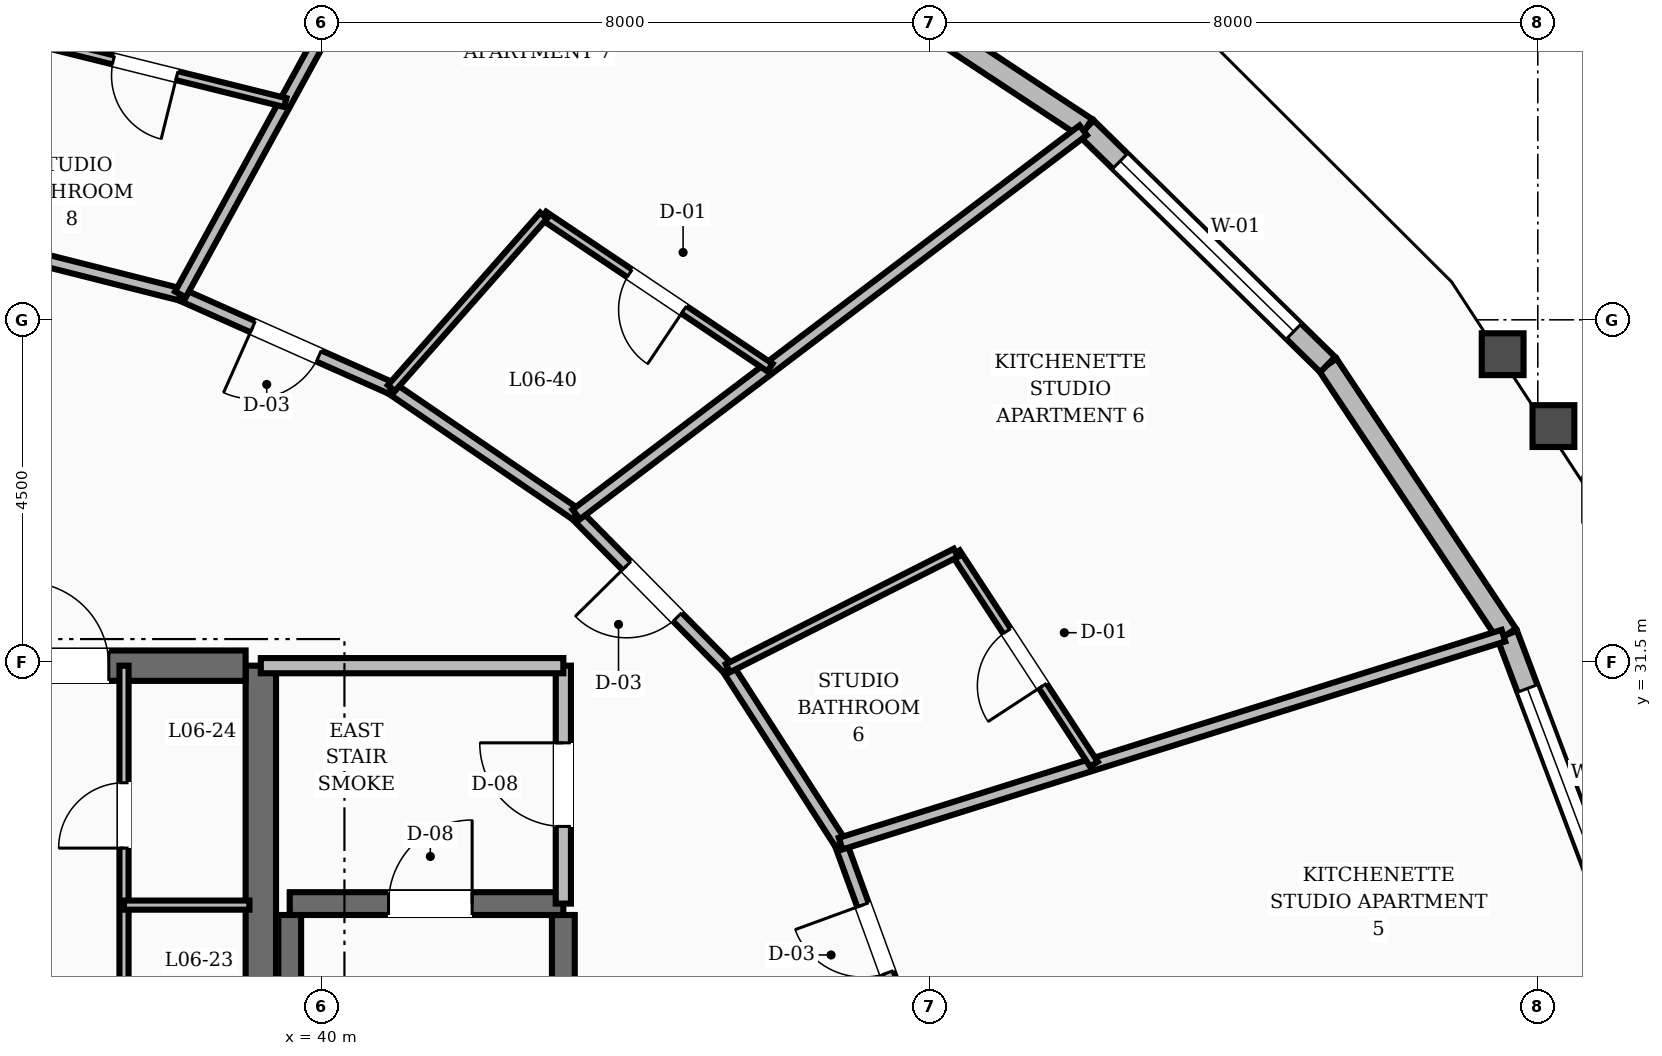
"""IFC4 building model, lengths in metres.
Left out: names, types, materials, properties, quantities, classifications, styles, units other than length and angle.
Written with IfcOpenShell. Run it as: python <this file> out.ifc"""

import sys

from ifc_helpers import new_model, si_unit, direction, frame, frame_2d, origin, place, context, subcontext, project, spatial, rectangle, extrude, element, fill, save


model = new_model("IFC4")
c1 = context("Model", 3, precision=1e-05, world=origin(), true_north=direction((0.0, 1.0)))
c2 = subcontext(c1, "Body", "Model", "MODEL_VIEW")
j1 = project(units=[si_unit("LENGTHUNIT", "METRE"), si_unit("PLANEANGLEUNIT", "RADIAN")], contexts=[c1])
p1 = place(None, origin())
s1 = spatial("IfcSite", under=j1, at=p1, CompositionType="ELEMENT")
p2 = place(p1, origin())
s2 = spatial("IfcBuilding", under=s1, at=p2, CompositionType="ELEMENT")
p3 = place(p2, frame((0.0, 0.0, 30.4)))
s3 = spatial("IfcBuildingStorey", under=s2, at=p3, CompositionType="ELEMENT", Elevation=30.4)
p4 = place(p3, frame((39.2, 25.15, 0.0), z_axis=(0.0, 0.0, 1.0), x_axis=(0.0, 1.0, 0.0)))
e1 = element("IfcWall", 1, at=p4, inside=s3, PredefinedType="SHEAR", context=c2, shape_type="SweptSolid", body=[
    extrude(rectangle(XDim=6.3, YDim=0.4, at=frame_2d((3.15, 0.0))), origin(), (0.0, 0.0, 1.0), 3.6),
])
p5 = place(p3, frame((35.8, 31.45, 0.0), z_axis=(0.0, 0.0, 1.0), x_axis=(1.0, 0.0, 0.0)))
e2 = element("IfcWall", 2, at=p5, inside=s3, PredefinedType="SHEAR", context=c2, shape_type="SweptSolid", body=[
    extrude(rectangle(XDim=3.2, YDim=0.4, at=frame_2d((1.6, 0.0))), origin(), (0.0, 0.0, 1.0), 3.6),
])
p6 = place(p5, frame((0.3, 0.0, 0.0)))
e3 = element("IfcOpeningElement", 3, at=p6, cuts=e2, PredefinedType="OPENING", context=c2, shape_type="SweptSolid", body=[
    extrude(rectangle(XDim=1.1, YDim=2.1, at=frame_2d((0.55, 1.05))), frame((0.0, 0.21, 0.0), z_axis=(0.0, -1.0, 0.0), x_axis=(1.0, 0.0, 0.0)), (0.0, 0.0, 1.0), 0.42),
])
for number, where, z_axis, x_axis in (
    (4, (43.18, 19.43, 0.0), (0.0, 0.0, 1.0), (0.0, 1.0, 0.0)),
    (5, (39.58, 19.43, 0.0), (0.0, 0.0, 1.0), (0.0, 1.0, 0.0)),
):
    element("IfcWall", number, at=place(p3, frame(where, z_axis=z_axis, x_axis=x_axis)), inside=s3, PredefinedType="SHEAR", context=c2, shape_type="SweptSolid", body=[
        extrude(rectangle(XDim=8.74, YDim=0.3, at=frame_2d((4.37, 0.0))), origin(), (0.0, 0.0, 1.0), 3.6),
    ])
p7 = place(p3, frame((39.58, 28.32, 0.0), z_axis=(0.0, 0.0, 1.0), x_axis=(1.0, 0.0, 0.0)))
e6 = element("IfcWall", 6, at=p7, inside=s3, PredefinedType="SHEAR", context=c2, shape_type="SweptSolid", body=[
    extrude(rectangle(XDim=3.6, YDim=0.3, at=frame_2d((1.8, 0.0))), origin(), (0.0, 0.0, 1.0), 3.6),
])
p8 = place(p7, frame((1.3, 0.0, 0.0)))
e7 = element("IfcOpeningElement", 7, at=p8, cuts=e6, PredefinedType="OPENING", context=c2, shape_type="SweptSolid", body=[
    extrude(rectangle(XDim=1.1, YDim=2.1, at=frame_2d((0.55, 1.05))), frame((0.0, 0.16, 0.0), z_axis=(0.0, -1.0, 0.0), x_axis=(1.0, 0.0, 0.0)), (0.0, 0.0, 1.0), 0.32),
])
p9 = place(p3, frame((57.049, 28.007, 0.0), z_axis=(0.0, 0.0, 1.0), x_axis=(-0.352909401731, 0.935657498324, 0.0)))
e8 = element("IfcWall", 8, at=p9, inside=s3, PredefinedType="STANDARD", context=c2, shape_type="SweptSolid", body=[
    extrude(rectangle(XDim=4.118, YDim=0.28, at=frame_2d((2.059, 0.0))), origin(), (0.0, 0.0, 1.0), 2.65),
])
p10 = place(p9, frame((0.759, 0.0, 0.8)))
e9 = element("IfcOpeningElement", 9, at=p10, cuts=e8, PredefinedType="OPENING", context=c2, shape_type="SweptSolid", body=[
    extrude(rectangle(XDim=2.6, YDim=1.65, at=frame_2d((1.3, 0.825))), frame((0.0, 0.15, 0.0), z_axis=(0.0, -1.0, 0.0), x_axis=(1.0, 0.0, 0.0)), (0.0, 0.0, 1.0), 0.3),
])
p11 = place(p3, frame((55.596, 31.86, 0.0), z_axis=(0.0, 0.0, 1.0), x_axis=(-0.55356334222, 0.832807076189, 0.0)))
e10 = element("IfcWall", 10, at=p11, inside=s3, PredefinedType="STANDARD", context=c2, shape_type="SweptSolid", body=[
    extrude(rectangle(XDim=4.264, YDim=0.28, at=frame_2d((2.132, 0.0))), origin(), (0.0, 0.0, 1.0), 2.65),
])
p12 = place(p3, frame((53.236, 35.411, 0.0), z_axis=(0.0, 0.0, 1.0), x_axis=(-0.714207899037, 0.699933623248, 0.0)))
e11 = element("IfcWall", 11, at=p12, inside=s3, PredefinedType="STANDARD", context=c2, shape_type="SweptSolid", body=[
    extrude(rectangle(XDim=4.447, YDim=0.28, at=frame_2d((2.224, 0.0))), origin(), (0.0, 0.0, 1.0), 2.65),
])
p13 = place(p12, frame((0.624, 0.0, 0.8)))
e12 = element("IfcOpeningElement", 12, at=p13, cuts=e11, PredefinedType="OPENING", context=c2, shape_type="SweptSolid", body=[
    extrude(rectangle(XDim=3.2, YDim=1.65, at=frame_2d((1.6, 0.825))), frame((0.0, 0.15, 0.0), z_axis=(0.0, -1.0, 0.0), x_axis=(1.0, 0.0, 0.0)), (0.0, 0.0, 1.0), 0.3),
])
p14 = place(p3, frame((50.06, 38.524, 0.0), z_axis=(0.0, 0.0, 1.0), x_axis=(-0.834608922487, 0.550842941776, 0.0)))
e13 = element("IfcWall", 13, at=p14, inside=s3, PredefinedType="STANDARD", context=c2, shape_type="SweptSolid", body=[
    extrude(rectangle(XDim=4.637, YDim=0.28, at=frame_2d((2.319, 0.0))), origin(), (0.0, 0.0, 1.0), 2.65),
])
p15 = place(p3, frame((43.18, 28.32, 0.0), z_axis=(0.0, 0.0, 1.0), x_axis=(0.0, 1.0, 0.0)))
e14 = element("IfcWall", 14, at=p15, inside=s3, PredefinedType="SOLIDWALL", context=c2, shape_type="SweptSolid", body=[
    extrude(rectangle(XDim=3.13, YDim=0.2, at=frame_2d((1.565, 0.0))), origin(), (0.0, 0.0, 1.0), 2.61),
])
p16 = place(p15, frame((1.015, 0.0, 0.0)))
e15 = element("IfcOpeningElement", 15, at=p16, cuts=e14, PredefinedType="OPENING", context=c2, shape_type="SweptSolid", body=[
    extrude(rectangle(XDim=1.1, YDim=2.1, at=frame_2d((0.55, 1.05))), frame((0.0, 0.11, 0.0), z_axis=(0.0, -1.0, 0.0), x_axis=(1.0, 0.0, 0.0)), (0.0, 0.0, 1.0), 0.22),
])
p17 = place(p3, frame((39.2, 31.45, 0.0), z_axis=(0.0, 0.0, 1.0), x_axis=(1.0, 0.0, 0.0)))
e16 = element("IfcWall", 16, at=p17, inside=s3, PredefinedType="SOLIDWALL", context=c2, shape_type="SweptSolid", body=[
    extrude(rectangle(XDim=3.98, YDim=0.2, at=frame_2d((1.99, 0.0))), origin(), (0.0, 0.0, 1.0), 2.61),
])
p18 = place(p3, frame((37.4, 25.25, 0.0), z_axis=(0.0, 0.0, 1.0), x_axis=(0.0, 1.0, 0.0)))
e17 = element("IfcWall", 17, at=p18, inside=s3, PredefinedType="PARTITIONING", context=c2, shape_type="SweptSolid", body=[
    extrude(rectangle(XDim=6.2, YDim=0.12, at=frame_2d((3.1, 0.0))), origin(), (0.0, 0.0, 1.0), 2.61),
])
p19 = place(p18, frame((0.8, 0.0, 0.0)))
e18 = element("IfcOpeningElement", 18, at=p19, cuts=e17, PredefinedType="OPENING", context=c2, shape_type="SweptSolid", body=[
    extrude(rectangle(XDim=0.86, YDim=2.1, at=frame_2d((0.43, 1.05))), frame((0.0, 0.07, 0.0), z_axis=(0.0, -1.0, 0.0), x_axis=(1.0, 0.0, 0.0)), (0.0, 0.0, 1.0), 0.14),
])
p20 = place(p18, frame((3.8, 0.0, 0.0)))
e19 = element("IfcOpeningElement", 19, at=p20, cuts=e17, PredefinedType="OPENING", context=c2, shape_type="SweptSolid", body=[
    extrude(rectangle(XDim=0.86, YDim=2.1, at=frame_2d((0.43, 1.05))), frame((0.0, 0.07, 0.0), z_axis=(0.0, -1.0, 0.0), x_axis=(1.0, 0.0, 0.0)), (0.0, 0.0, 1.0), 0.14),
])
p21 = place(p3, frame((37.4, 28.3, 0.0), z_axis=(0.0, 0.0, 1.0), x_axis=(1.0, 0.0, 0.0)))
e20 = element("IfcWall", 20, at=p21, inside=s3, PredefinedType="PARTITIONING", context=c2, shape_type="SweptSolid", body=[
    extrude(rectangle(XDim=1.65, YDim=0.12, at=frame_2d((0.825, 0.0))), origin(), (0.0, 0.0, 1.0), 2.61),
])
p22 = place(p3, frame((47.742, 26.604, 0.0), z_axis=(0.0, 0.0, 1.0), x_axis=(-0.342617982381, 0.939474809747, 0.0)))
e21 = element("IfcWall", 21, at=p22, inside=s3, PredefinedType="SOLIDWALL", context=c2, shape_type="SweptSolid", body=[
    extrude(rectangle(XDim=2.666, YDim=0.16, at=frame_2d((1.333, 0.0))), origin(), (0.0, 0.0, 1.0), 2.61),
])
p23 = place(p22, frame((0.858, 0.0, 0.0)))
e22 = element("IfcOpeningElement", 22, at=p23, cuts=e21, PredefinedType="OPENING", context=c2, shape_type="SweptSolid", body=[
    extrude(rectangle(XDim=0.95, YDim=2.1, at=frame_2d((0.475, 1.05))), frame((0.0, 0.09, 0.0), z_axis=(0.0, -1.0, 0.0), x_axis=(1.0, 0.0, 0.0)), (0.0, 0.0, 1.0), 0.18),
])
p24 = place(p3, frame((46.828, 29.109, 0.0), z_axis=(0.0, 0.0, 1.0), x_axis=(-0.540595670038, 0.841282545603, 0.0)))
e23 = element("IfcWall", 23, at=p24, inside=s3, PredefinedType="SOLIDWALL", context=c2, shape_type="SweptSolid", body=[
    extrude(rectangle(XDim=2.744, YDim=0.16, at=frame_2d((1.372, 0.0))), origin(), (0.0, 0.0, 1.0), 2.61),
])
p25 = place(p3, frame((45.345, 31.417, 0.0), z_axis=(0.0, 0.0, 1.0), x_axis=(-0.702366174226, 0.711815816981, 0.0)))
e24 = element("IfcWall", 24, at=p25, inside=s3, PredefinedType="SOLIDWALL", context=c2, shape_type="SweptSolid", body=[
    extrude(rectangle(XDim=2.842, YDim=0.16, at=frame_2d((1.421, 0.0))), origin(), (0.0, 0.0, 1.0), 2.61),
])
p26 = place(p25, frame((0.946, 0.0, 0.0)))
e25 = element("IfcOpeningElement", 25, at=p26, cuts=e24, PredefinedType="OPENING", context=c2, shape_type="SweptSolid", body=[
    extrude(rectangle(XDim=0.95, YDim=2.1, at=frame_2d((0.475, 1.05))), frame((0.0, 0.09, 0.0), z_axis=(0.0, -1.0, 0.0), x_axis=(1.0, 0.0, 0.0)), (0.0, 0.0, 1.0), 0.18),
])
p27 = place(p3, frame((43.349, 33.44, 0.0), z_axis=(0.0, 0.0, 1.0), x_axis=(-0.825929039072, 0.563774088104, 0.0)))
e26 = element("IfcWall", 26, at=p27, inside=s3, PredefinedType="SOLIDWALL", context=c2, shape_type="SweptSolid", body=[
    extrude(rectangle(XDim=2.945, YDim=0.16, at=frame_2d((1.472, 0.0))), origin(), (0.0, 0.0, 1.0), 2.61),
])
p28 = place(p3, frame((40.917, 35.1, 0.0), z_axis=(0.0, 0.0, 1.0), x_axis=(-0.913768445178, 0.406235434936, 0.0)))
e27 = element("IfcWall", 27, at=p28, inside=s3, PredefinedType="SOLIDWALL", context=c2, shape_type="SweptSolid", body=[
    extrude(rectangle(XDim=3.037, YDim=0.16, at=frame_2d((1.519, 0.0))), origin(), (0.0, 0.0, 1.0), 2.61),
])
p29 = place(p28, frame((1.043, 0.0, 0.0)))
e28 = element("IfcOpeningElement", 28, at=p29, cuts=e27, PredefinedType="OPENING", context=c2, shape_type="SweptSolid", body=[
    extrude(rectangle(XDim=0.95, YDim=2.1, at=frame_2d((0.475, 1.05))), frame((0.0, 0.09, 0.0), z_axis=(0.0, -1.0, 0.0), x_axis=(1.0, 0.0, 0.0)), (0.0, 0.0, 1.0), 0.18),
])
p30 = place(p3, frame((38.142, 36.334, 0.0), z_axis=(0.0, 0.0, 1.0), x_axis=(-0.969608333194, 0.244662380029, 0.0)))
e29 = element("IfcWall", 29, at=p30, inside=s3, PredefinedType="SOLIDWALL", context=c2, shape_type="SweptSolid", body=[
    extrude(rectangle(XDim=3.105, YDim=0.16, at=frame_2d((1.553, 0.0))), origin(), (0.0, 0.0, 1.0), 2.61),
])
p31 = place(p3, frame((46.828, 29.109, 0.0), z_axis=(0.0, 0.0, 1.0), x_axis=(0.954123744585, 0.299412558218, 0.0)))
e30 = element("IfcWall", 30, at=p31, inside=s3, PredefinedType="SOLIDWALL", context=c2, shape_type="SweptSolid", body=[
    extrude(rectangle(XDim=9.139, YDim=0.16, at=frame_2d((4.569, 0.0))), origin(), (0.0, 0.0, 1.0), 2.61),
])
p32 = place(p3, frame((50.16, 30.154, 0.0), z_axis=(0.0, 0.0, 1.0), x_axis=(-0.546906681568, 0.837193574782, 0.0)))
e31 = element("IfcWall", 31, at=p32, inside=s3, PredefinedType="PARTITIONING", context=c2, shape_type="SweptSolid", body=[
    extrude(rectangle(XDim=3.321, YDim=0.12, at=frame_2d((1.661, 0.0))), origin(), (0.0, 0.0, 1.0), 2.61),
])
p33 = place(p32, frame((1.231, 0.0, 0.0)))
e32 = element("IfcOpeningElement", 32, at=p33, cuts=e31, PredefinedType="OPENING", context=c2, shape_type="SweptSolid", body=[
    extrude(rectangle(XDim=0.86, YDim=2.1, at=frame_2d((0.43, 1.05))), frame((0.0, 0.07, 0.0), z_axis=(0.0, -1.0, 0.0), x_axis=(1.0, 0.0, 0.0)), (0.0, 0.0, 1.0), 0.14),
])
p34 = place(p3, frame((45.345, 31.417, 0.0), z_axis=(0.0, 0.0, 1.0), x_axis=(0.892193104213, 0.451654142895, 0.0)))
e33 = element("IfcWall", 33, at=p34, inside=s3, PredefinedType="PARTITIONING", context=c2, shape_type="SweptSolid", body=[
    extrude(rectangle(XDim=3.361, YDim=0.12, at=frame_2d((1.68, 0.0))), origin(), (0.0, 0.0, 1.0), 2.61),
])
p35 = place(p3, frame((43.349, 33.44, 0.0), z_axis=(0.0, 0.0, 1.0), x_axis=(0.797056829768, 0.603904305433, 0.0)))
e34 = element("IfcWall", 34, at=p35, inside=s3, PredefinedType="SOLIDWALL", context=c2, shape_type="SweptSolid", body=[
    extrude(rectangle(XDim=8.369, YDim=0.16, at=frame_2d((4.185, 0.0))), origin(), (0.0, 0.0, 1.0), 2.61),
])
p36 = place(p3, frame((45.899, 35.372, 0.0), z_axis=(0.0, 0.0, 1.0), x_axis=(-0.830224279985, 0.557429497716, 0.0)))
e35 = element("IfcWall", 35, at=p36, inside=s3, PredefinedType="PARTITIONING", context=c2, shape_type="SweptSolid", body=[
    extrude(rectangle(XDim=3.588, YDim=0.12, at=frame_2d((1.794, 0.0))), origin(), (0.0, 0.0, 1.0), 2.61),
])
p37 = place(p36, frame((1.364, 0.0, 0.0)))
e36 = element("IfcOpeningElement", 36, at=p37, cuts=e35, PredefinedType="OPENING", context=c2, shape_type="SweptSolid", body=[
    extrude(rectangle(XDim=0.86, YDim=2.1, at=frame_2d((0.43, 1.05))), frame((0.0, 0.07, 0.0), z_axis=(0.0, -1.0, 0.0), x_axis=(1.0, 0.0, 0.0)), (0.0, 0.0, 1.0), 0.14),
])
p38 = place(p3, frame((40.917, 35.1, 0.0), z_axis=(0.0, 0.0, 1.0), x_axis=(0.661427007528, 0.750009542414, 0.0)))
e37 = element("IfcWall", 37, at=p38, inside=s3, PredefinedType="PARTITIONING", context=c2, shape_type="SweptSolid", body=[
    extrude(rectangle(XDim=3.029, YDim=0.12, at=frame_2d((1.515, 0.0))), origin(), (0.0, 0.0, 1.0), 2.61),
])
p39 = place(p3, frame((38.142, 36.334, 0.0), z_axis=(0.0, 0.0, 1.0), x_axis=(0.479700277593, 0.877432415447, 0.0)))
e38 = element("IfcWall", 38, at=p39, inside=s3, PredefinedType="SOLIDWALL", context=c2, shape_type="SweptSolid", body=[
    extrude(rectangle(XDim=7.521, YDim=0.16, at=frame_2d((3.76, 0.0))), origin(), (0.0, 0.0, 1.0), 2.61),
])
p40 = place(p3, frame((39.522, 38.858, 0.0), z_axis=(0.0, 0.0, 1.0), x_axis=(-0.970549351757, 0.240902378161, 0.0)))
e39 = element("IfcWall", 39, at=p40, inside=s3, PredefinedType="PARTITIONING", context=c2, shape_type="SweptSolid", body=[
    extrude(rectangle(XDim=3.799, YDim=0.12, at=frame_2d((1.9, 0.0))), origin(), (0.0, 0.0, 1.0), 2.61),
])
p41 = place(p40, frame((1.47, 0.0, 0.0)))
e40 = element("IfcOpeningElement", 40, at=p41, cuts=e39, PredefinedType="OPENING", context=c2, shape_type="SweptSolid", body=[
    extrude(rectangle(XDim=0.86, YDim=2.1, at=frame_2d((0.43, 1.05))), frame((0.0, 0.07, 0.0), z_axis=(0.0, -1.0, 0.0), x_axis=(1.0, 0.0, 0.0)), (0.0, 0.0, 1.0), 0.14),
])
p42 = place(p10, origin())
e41 = element("IfcWindow", 41, at=p42, inside=s3, PartitioningType="SINGLE_PANEL", PredefinedType="WINDOW", context=c2, shape_type="SweptSolid", body=[
    extrude(rectangle(XDim=2.6, YDim=1.65, at=frame_2d((1.3, 0.825))), frame((0.0, 0.03, 0.0), z_axis=(0.0, -1.0, 0.0), x_axis=(1.0, 0.0, 0.0)), (0.0, 0.0, 1.0), 0.06),
])
fill(e9, e41)
p43 = place(p13, origin())
e42 = element("IfcWindow", 42, at=p43, inside=s3, PartitioningType="SINGLE_PANEL", PredefinedType="WINDOW", context=c2, shape_type="SweptSolid", body=[
    extrude(rectangle(XDim=3.2, YDim=1.65, at=frame_2d((1.6, 0.825))), frame((0.0, 0.03, 0.0), z_axis=(0.0, -1.0, 0.0), x_axis=(1.0, 0.0, 0.0)), (0.0, 0.0, 1.0), 0.06),
])
fill(e12, e42)
p44 = place(p8, origin())
e43 = element("IfcDoor", 43, at=p44, inside=s3, OperationType="SINGLE_SWING_RIGHT", PredefinedType="DOOR", context=c2, shape_type="SweptSolid", body=[
    extrude(rectangle(XDim=1.1, YDim=2.1, at=frame_2d((0.55, 1.05))), frame((0.0, 0.025, 0.0), z_axis=(0.0, -1.0, 0.0), x_axis=(1.0, 0.0, 0.0)), (0.0, 0.0, 1.0), 0.05),
])
fill(e7, e43)
p45 = place(p16, origin())
e44 = element("IfcDoor", 44, at=p45, inside=s3, OperationType="SINGLE_SWING_RIGHT", PredefinedType="DOOR", context=c2, shape_type="SweptSolid", body=[
    extrude(rectangle(XDim=1.1, YDim=2.1, at=frame_2d((0.55, 1.05))), frame((0.0, 0.025, 0.0), z_axis=(0.0, -1.0, 0.0), x_axis=(1.0, 0.0, 0.0)), (0.0, 0.0, 1.0), 0.05),
])
fill(e15, e44)
p46 = place(p6, origin())
e45 = element("IfcDoor", 45, at=p46, inside=s3, OperationType="SINGLE_SWING_LEFT", PredefinedType="DOOR", context=c2, shape_type="SweptSolid", body=[
    extrude(rectangle(XDim=1.1, YDim=2.1, at=frame_2d((0.55, 1.05))), frame((0.0, 0.025, 0.0), z_axis=(0.0, -1.0, 0.0), x_axis=(1.0, 0.0, 0.0)), (0.0, 0.0, 1.0), 0.05),
])
fill(e3, e45)
p47 = place(p20, origin())
e46 = element("IfcDoor", 46, at=p47, inside=s3, OperationType="SINGLE_SWING_LEFT", PredefinedType="DOOR", context=c2, shape_type="SweptSolid", body=[
    extrude(rectangle(XDim=0.86, YDim=2.1, at=frame_2d((0.43, 1.05))), frame((0.0, 0.025, 0.0), z_axis=(0.0, -1.0, 0.0), x_axis=(1.0, 0.0, 0.0)), (0.0, 0.0, 1.0), 0.05),
])
fill(e19, e46)
p48 = place(p23, origin())
e47 = element("IfcDoor", 47, at=p48, inside=s3, OperationType="SINGLE_SWING_RIGHT", PredefinedType="DOOR", context=c2, shape_type="SweptSolid", body=[
    extrude(rectangle(XDim=0.95, YDim=2.1, at=frame_2d((0.475, 1.05))), frame((0.0, 0.025, 0.0), z_axis=(0.0, -1.0, 0.0), x_axis=(1.0, 0.0, 0.0)), (0.0, 0.0, 1.0), 0.05),
])
fill(e22, e47)
p49 = place(p33, origin())
e48 = element("IfcDoor", 48, at=p49, inside=s3, OperationType="SINGLE_SWING_LEFT", PredefinedType="DOOR", context=c2, shape_type="SweptSolid", body=[
    extrude(rectangle(XDim=0.86, YDim=2.1, at=frame_2d((0.43, 1.05))), frame((0.0, 0.025, 0.0), z_axis=(0.0, -1.0, 0.0), x_axis=(1.0, 0.0, 0.0)), (0.0, 0.0, 1.0), 0.05),
])
fill(e32, e48)
p50 = place(p26, origin())
e49 = element("IfcDoor", 49, at=p50, inside=s3, OperationType="SINGLE_SWING_RIGHT", PredefinedType="DOOR", context=c2, shape_type="SweptSolid", body=[
    extrude(rectangle(XDim=0.95, YDim=2.1, at=frame_2d((0.475, 1.05))), frame((0.0, 0.025, 0.0), z_axis=(0.0, -1.0, 0.0), x_axis=(1.0, 0.0, 0.0)), (0.0, 0.0, 1.0), 0.05),
])
fill(e25, e49)
p51 = place(p37, origin())
e50 = element("IfcDoor", 50, at=p51, inside=s3, OperationType="SINGLE_SWING_LEFT", PredefinedType="DOOR", context=c2, shape_type="SweptSolid", body=[
    extrude(rectangle(XDim=0.86, YDim=2.1, at=frame_2d((0.43, 1.05))), frame((0.0, 0.025, 0.0), z_axis=(0.0, -1.0, 0.0), x_axis=(1.0, 0.0, 0.0)), (0.0, 0.0, 1.0), 0.05),
])
fill(e36, e50)
p52 = place(p29, origin())
e51 = element("IfcDoor", 51, at=p52, inside=s3, OperationType="SINGLE_SWING_RIGHT", PredefinedType="DOOR", context=c2, shape_type="SweptSolid", body=[
    extrude(rectangle(XDim=0.95, YDim=2.1, at=frame_2d((0.475, 1.05))), frame((0.0, 0.025, 0.0), z_axis=(0.0, -1.0, 0.0), x_axis=(1.0, 0.0, 0.0)), (0.0, 0.0, 1.0), 0.05),
])
fill(e28, e51)
p53 = place(p41, origin())
e52 = element("IfcDoor", 52, at=p53, inside=s3, OperationType="SINGLE_SWING_LEFT", PredefinedType="DOOR", context=c2, shape_type="SweptSolid", body=[
    extrude(rectangle(XDim=0.86, YDim=2.1, at=frame_2d((0.43, 1.05))), frame((0.0, 0.025, 0.0), z_axis=(0.0, -1.0, 0.0), x_axis=(1.0, 0.0, 0.0)), (0.0, 0.0, 1.0), 0.05),
])
fill(e40, e52)
save(model, sys.argv[1])
